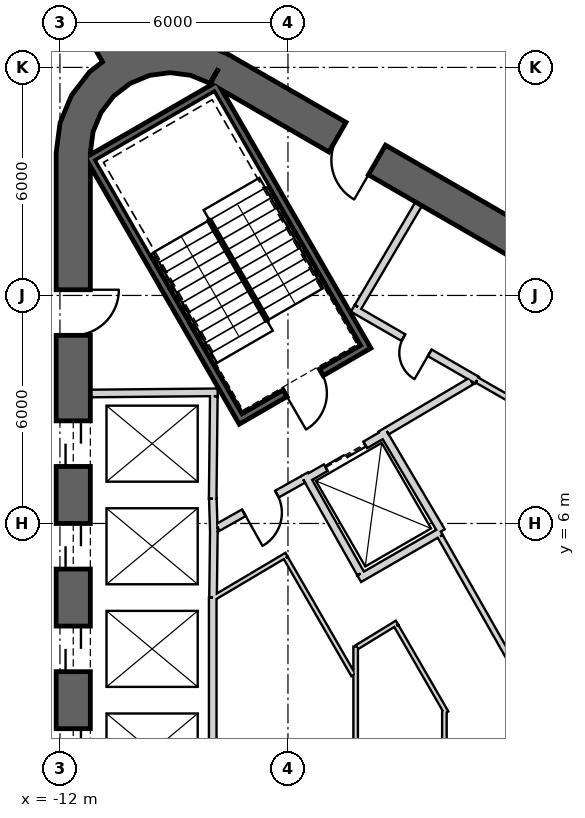
"""IFC4 building model, lengths in metres.
Left out: names, types, materials, properties, quantities, classifications, styles, units other than length and angle.
Written with IfcOpenShell. Run it as: python <this file> out.ifc"""

import sys

from ifc_helpers import new_model, si_unit, direction, frame, frame_2d, origin, place, context, subcontext, project, spatial, polyline, rectangle, outline, extrude, element, fill, save


model = new_model("IFC4")
c1 = context("Model", 3, precision=1e-05, world=origin(), true_north=direction((0.0, 1.0)))
c2 = subcontext(c1, "Body", "Model", "MODEL_VIEW")
j1 = project(units=[si_unit("LENGTHUNIT", "METRE"), si_unit("PLANEANGLEUNIT", "RADIAN")], contexts=[c1])
p1 = place(None, origin())
s1 = spatial("IfcSite", under=j1, at=p1, CompositionType="ELEMENT")
p2 = place(p1, origin())
s2 = spatial("IfcBuilding", under=s1, at=p2, CompositionType="ELEMENT")
p3 = place(p2, frame((0.0, 0.0, 265.2)))
s3 = spatial("IfcBuildingStorey", under=s2, at=p3, CompositionType="ELEMENT", Elevation=265.2)
p4 = place(p3, frame((19.475, 2.208, 0.0), z_axis=(0.0, 0.0, 1.0), x_axis=(-0.866028369851, 0.499994862586, 0.0)))
e1 = element("IfcWall", 1, at=p4, inside=s3, PredefinedType="SHEAR", context=c2, shape_type="SweptSolid", body=[
    extrude(rectangle(XDim=31.523, YDim=0.9, at=frame_2d((15.762, 0.0))), origin(), (0.0, 0.0, 1.0), 4.0),
])
p5 = place(p4, frame((7.062, 0.0, 0.0)))
e2 = element("IfcOpeningElement", 2, at=p5, cuts=e1, PredefinedType="OPENING", context=c2, shape_type="SweptSolid", body=[
    extrude(rectangle(XDim=1.2, YDim=2.4, at=frame_2d((0.6, 1.2))), frame((0.0, 0.46, 0.0), z_axis=(0.0, -1.0, 0.0), x_axis=(1.0, 0.0, 0.0)), (0.0, 0.0, 1.0), 0.92),
])
p6 = place(p4, frame((3.612, 0.0, 0.0)))
e3 = element("IfcOpeningElement", 3, at=p6, cuts=e1, PredefinedType="OPENING", context=c2, shape_type="SweptSolid", body=[
    extrude(rectangle(XDim=1.2, YDim=2.4, at=frame_2d((0.6, 1.2))), frame((0.0, 0.46, 0.0), z_axis=(0.0, -1.0, 0.0), x_axis=(1.0, 0.0, 0.0)), (0.0, 0.0, 1.0), 0.92),
])
p7 = place(p4, frame((26.712, 0.0, 0.0)))
e4 = element("IfcOpeningElement", 4, at=p7, cuts=e1, PredefinedType="OPENING", context=c2, shape_type="SweptSolid", body=[
    extrude(rectangle(XDim=1.2, YDim=2.4, at=frame_2d((0.6, 1.2))), frame((0.0, 0.46, 0.0), z_axis=(0.0, -1.0, 0.0), x_axis=(1.0, 0.0, 0.0)), (0.0, 0.0, 1.0), 0.92),
])
p8 = place(p3, frame((-11.65, 15.762, 0.0), z_axis=(0.0, 0.0, 1.0), x_axis=(0.0, -1.0, 0.0)))
e5 = element("IfcWall", 5, at=p8, inside=s3, PredefinedType="SHEAR", context=c2, shape_type="SweptSolid", body=[
    extrude(rectangle(XDim=31.523, YDim=0.9, at=frame_2d((15.762, 0.0))), origin(), (0.0, 0.0, 1.0), 4.0),
])
p9 = place(p8, frame((7.062, 0.0, 0.0)))
e6 = element("IfcOpeningElement", 6, at=p9, cuts=e5, PredefinedType="OPENING", context=c2, shape_type="SweptSolid", body=[
    extrude(rectangle(XDim=1.2, YDim=2.4, at=frame_2d((0.6, 1.2))), frame((0.0, 0.46, 0.0), z_axis=(0.0, -1.0, 0.0), x_axis=(1.0, 0.0, 0.0)), (0.0, 0.0, 1.0), 0.92),
])
p10 = place(p8, frame((9.762, 0.0, 0.0)))
e7 = element("IfcOpeningElement", 7, at=p10, cuts=e5, PredefinedType="OPENING", context=c2, shape_type="SweptSolid", body=[
    extrude(rectangle(XDim=1.2, YDim=2.4, at=frame_2d((0.6, 1.2))), frame((0.0, 0.46, 0.0), z_axis=(0.0, -1.0, 0.0), x_axis=(1.0, 0.0, 0.0)), (0.0, 0.0, 1.0), 0.92),
])
p11 = place(p8, frame((12.462, 0.0, 0.0)))
e8 = element("IfcOpeningElement", 8, at=p11, cuts=e5, PredefinedType="OPENING", context=c2, shape_type="SweptSolid", body=[
    extrude(rectangle(XDim=1.2, YDim=2.4, at=frame_2d((0.6, 1.2))), frame((0.0, 0.46, 0.0), z_axis=(0.0, -1.0, 0.0), x_axis=(1.0, 0.0, 0.0)), (0.0, 0.0, 1.0), 0.92),
])
p12 = place(p8, frame((15.162, 0.0, 0.0)))
e9 = element("IfcOpeningElement", 9, at=p12, cuts=e5, PredefinedType="OPENING", context=c2, shape_type="SweptSolid", body=[
    extrude(rectangle(XDim=1.2, YDim=2.4, at=frame_2d((0.6, 1.2))), frame((0.0, 0.46, 0.0), z_axis=(0.0, -1.0, 0.0), x_axis=(1.0, 0.0, 0.0)), (0.0, 0.0, 1.0), 0.92),
])
p13 = place(p8, frame((17.862, 0.0, 0.0)))
e10 = element("IfcOpeningElement", 10, at=p13, cuts=e5, PredefinedType="OPENING", context=c2, shape_type="SweptSolid", body=[
    extrude(rectangle(XDim=1.2, YDim=2.4, at=frame_2d((0.6, 1.2))), frame((0.0, 0.46, 0.0), z_axis=(0.0, -1.0, 0.0), x_axis=(1.0, 0.0, 0.0)), (0.0, 0.0, 1.0), 0.92),
])
p14 = place(p8, frame((20.562, 0.0, 0.0)))
e11 = element("IfcOpeningElement", 11, at=p14, cuts=e5, PredefinedType="OPENING", context=c2, shape_type="SweptSolid", body=[
    extrude(rectangle(XDim=1.2, YDim=2.4, at=frame_2d((0.6, 1.2))), frame((0.0, 0.46, 0.0), z_axis=(0.0, -1.0, 0.0), x_axis=(1.0, 0.0, 0.0)), (0.0, 0.0, 1.0), 0.92),
])
p15 = place(p8, frame((23.262, 0.0, 0.0)))
e12 = element("IfcOpeningElement", 12, at=p15, cuts=e5, PredefinedType="OPENING", context=c2, shape_type="SweptSolid", body=[
    extrude(rectangle(XDim=1.2, YDim=2.4, at=frame_2d((0.6, 1.2))), frame((0.0, 0.46, 0.0), z_axis=(0.0, -1.0, 0.0), x_axis=(1.0, 0.0, 0.0)), (0.0, 0.0, 1.0), 0.92),
])
p16 = place(p8, frame((3.612, 0.0, 0.0)))
e13 = element("IfcOpeningElement", 13, at=p16, cuts=e5, PredefinedType="OPENING", context=c2, shape_type="SweptSolid", body=[
    extrude(rectangle(XDim=1.2, YDim=2.4, at=frame_2d((0.6, 1.2))), frame((0.0, 0.46, 0.0), z_axis=(0.0, -1.0, 0.0), x_axis=(1.0, 0.0, 0.0)), (0.0, 0.0, 1.0), 0.92),
])
p17 = place(p8, frame((26.712, 0.0, 0.0)))
e14 = element("IfcOpeningElement", 14, at=p17, cuts=e5, PredefinedType="OPENING", context=c2, shape_type="SweptSolid", body=[
    extrude(rectangle(XDim=1.2, YDim=2.4, at=frame_2d((0.6, 1.2))), frame((0.0, 0.46, 0.0), z_axis=(0.0, -1.0, 0.0), x_axis=(1.0, 0.0, 0.0)), (0.0, 0.0, 1.0), 0.92),
])
p18 = place(p3, origin())
e15 = element("IfcWall", 15, at=p18, inside=s3, PredefinedType="SHEAR", context=c2, shape_type="SweptSolid", body=[
    extrude(outline(polyline([(-7.6, 18.36), (-8.323, 18.659), (-9.1, 18.762), (-9.876, 18.659), (-10.6, 18.36), (-11.221, 17.883), (-11.698, 17.262), (-11.998, 16.538), (-12.1, 15.762), (-11.2, 15.762), (-11.128, 16.305), (-10.919, 16.812), (-10.585, 17.247), (-10.15, 17.58), (-9.644, 17.79), (-9.1, 17.862), (-8.556, 17.79), (-8.05, 17.58), (-7.6, 18.36)])), origin(), (0.0, 0.0, 1.0), 4.0),
])
p19 = place(p3, frame((-10.575, 18.316, 0.0), z_axis=(0.0, 0.0, 1.0), x_axis=(-0.500007350791, 0.866021159762, 0.0)))
e16 = element("IfcWall", 16, at=p19, inside=s3, PredefinedType="SHEAR", context=c2, shape_type="SweptSolid", body=[
    extrude(rectangle(XDim=9.965, YDim=0.7, at=frame_2d((4.982, 0.0))), origin(), (0.0, 0.0, 1.0), 4.0),
])
p20 = place(p3, frame((-11.2, 9.42, 0.0), z_axis=(0.0, 0.0, 1.0), x_axis=(0.999957167047, 0.009255488683, 0.0)))
e17 = element("IfcWall", 17, at=p20, inside=s3, PredefinedType="PLUMBINGWALL", context=c2, shape_type="SweptSolid", body=[
    extrude(rectangle(XDim=3.35, YDim=0.2, at=frame_2d((1.675, 0.0))), origin(), (0.0, 0.0, 1.0), 3.7),
])
p21 = place(p3, frame((-7.951, 9.35, 0.0), z_axis=(0.0, 0.0, 1.0), x_axis=(-0.011120469654, -0.999938165666, 0.0)))
e18 = element("IfcWall", 18, at=p21, inside=s3, PredefinedType="PLUMBINGWALL", context=c2, shape_type="SweptSolid", body=[
    extrude(rectangle(XDim=2.7, YDim=0.2, at=frame_2d((1.35, 0.0))), origin(), (0.0, 0.0, 1.0), 3.7),
])
p22 = place(p3, frame((-7.977, 6.65, 0.0), z_axis=(0.0, 0.0, 1.0), x_axis=(0.030861509705, -0.999523670164, 0.0)))
e19 = element("IfcWall", 19, at=p22, inside=s3, PredefinedType="PLUMBINGWALL", context=c2, shape_type="SweptSolid", body=[
    extrude(rectangle(XDim=0.878, YDim=0.2, at=frame_2d((0.439, 0.0))), origin(), (0.0, 0.0, 1.0), 3.7),
])
p23 = place(p3, frame((-7.949, 5.895, 0.0), z_axis=(0.0, 0.0, 1.0), x_axis=(-0.012042535896, -0.999927486035, 0.0)))
e20 = element("IfcWall", 20, at=p23, inside=s3, PredefinedType="PLUMBINGWALL", context=c2, shape_type="SweptSolid", body=[
    extrude(rectangle(XDim=1.845, YDim=0.2, at=frame_2d((0.922, 0.0))), origin(), (0.0, 0.0, 1.0), 3.7),
])
p24 = place(p3, frame((-7.98, 4.05, 0.0), z_axis=(0.0, 0.0, 1.0), x_axis=(0.0, -1.0, 0.0)))
e21 = element("IfcWall", 21, at=p24, inside=s3, PredefinedType="PLUMBINGWALL", context=c2, shape_type="SweptSolid", body=[
    extrude(rectangle(XDim=8.1, YDim=0.2, at=frame_2d((4.05, 0.0))), origin(), (0.0, 0.0, 1.0), 3.7),
])
p25 = place(p3, frame((-11.245, 15.678, -0.3), z_axis=(0.0, 0.0, 1.0), x_axis=(0.499977274689, -0.866038523851, 0.0)))
e22 = element("IfcWall", 22, at=p25, inside=s3, PredefinedType="SHEAR", context=c2, shape_type="SweptSolid", body=[
    extrude(rectangle(XDim=8.1, YDim=0.2, at=frame_2d((4.05, 0.0))), origin(), (0.0, 0.0, 1.0), 4.0),
])
p26 = place(p3, frame((-7.818, 17.541, -0.3), z_axis=(0.0, 0.0, 1.0), x_axis=(-0.866044365799, -0.499967155389, 0.0)))
e23 = element("IfcWall", 23, at=p26, inside=s3, PredefinedType="SHEAR", context=c2, shape_type="SweptSolid", body=[
    extrude(rectangle(XDim=3.8, YDim=0.2, at=frame_2d((1.9, 0.0))), origin(), (0.0, 0.0, 1.0), 4.0),
])
p27 = place(p3, frame((-7.854, 17.405, -0.3), z_axis=(0.0, 0.0, 1.0), x_axis=(0.499997992926, -0.866026562566, 0.0)))
e24 = element("IfcWall", 24, at=p27, inside=s3, PredefinedType="SHEAR", context=c2, shape_type="SweptSolid", body=[
    extrude(rectangle(XDim=7.9, YDim=0.2, at=frame_2d((3.95, 0.0))), origin(), (0.0, 0.0, 1.0), 4.0),
])
p28 = place(p3, frame((-7.159, 8.8, -0.3), z_axis=(0.0, 0.0, 1.0), x_axis=(0.866047807691, 0.499961193289, 0.0)))
e25 = element("IfcWall", 25, at=p28, inside=s3, PredefinedType="SHEAR", context=c2, shape_type="SweptSolid", body=[
    extrude(rectangle(XDim=3.6, YDim=0.2, at=frame_2d((1.8, 0.0))), origin(), (0.0, 0.0, 1.0), 4.0),
])
p29 = place(p28, frame((1.25, 0.0, 0.3)))
e26 = element("IfcOpeningElement", 26, at=p29, cuts=e25, PredefinedType="OPENING", context=c2, shape_type="SweptSolid", body=[
    extrude(rectangle(XDim=1.1, YDim=2.1, at=frame_2d((0.55, 1.05))), frame((0.0, 0.11, 0.0), z_axis=(0.0, -1.0, 0.0), x_axis=(1.0, 0.0, 0.0)), (0.0, 0.0, 1.0), 0.22),
])
p30 = place(p3, frame((-5.524, 7.168, 0.0), z_axis=(0.0, 0.0, 1.0), x_axis=(0.866024647952, 0.500001309137, 0.0)))
e27 = element("IfcWall", 27, at=p30, inside=s3, PredefinedType="PLUMBINGWALL", context=c2, shape_type="SweptSolid", body=[
    extrude(rectangle(XDim=2.4, YDim=0.2, at=frame_2d((1.2, 0.0))), origin(), (0.0, 0.0, 1.0), 3.7),
])
p31 = place(p30, frame((0.6, 0.0, 0.0)))
e28 = element("IfcOpeningElement", 28, at=p31, cuts=e27, PredefinedType="OPENING", context=c2, shape_type="SweptSolid", body=[
    extrude(rectangle(XDim=1.2, YDim=2.4, at=frame_2d((0.6, 1.2))), frame((0.0, 0.11, 0.0), z_axis=(0.0, -1.0, 0.0), x_axis=(1.0, 0.0, 0.0)), (0.0, 0.0, 1.0), 0.22),
])
p32 = place(p3, frame((-3.538, 8.465, 0.0), z_axis=(0.0, 0.0, 1.0), x_axis=(0.508647062354, -0.860975125052, 0.0)))
e29 = element("IfcWall", 29, at=p32, inside=s3, PredefinedType="PLUMBINGWALL", context=c2, shape_type="SweptSolid", body=[
    extrude(rectangle(XDim=3.1, YDim=0.2, at=frame_2d((1.55, 0.0))), origin(), (0.0, 0.0, 1.0), 3.7),
])
p33 = place(p3, frame((-1.979, 5.786, 0.0), z_axis=(0.0, 0.0, 1.0), x_axis=(-0.866016689309, -0.500015093611, 0.0)))
e30 = element("IfcWall", 30, at=p33, inside=s3, PredefinedType="PLUMBINGWALL", context=c2, shape_type="SweptSolid", body=[
    extrude(rectangle(XDim=2.479, YDim=0.2, at=frame_2d((1.24, 0.0))), origin(), (0.0, 0.0, 1.0), 3.7),
])
p34 = place(p3, frame((-5.562, 7.296, 0.0), z_axis=(0.0, 0.0, 1.0), x_axis=(0.49134651263, -0.870964180966, 0.0)))
e31 = element("IfcWall", 31, at=p34, inside=s3, PredefinedType="PLUMBINGWALL", context=c2, shape_type="SweptSolid", body=[
    extrude(rectangle(XDim=3.0, YDim=0.2, at=frame_2d((1.5, 0.0))), origin(), (0.0, 0.0, 1.0), 3.7),
])
p35 = place(p3, frame((7.497, 4.886, 0.0), z_axis=(0.0, 0.0, 1.0), x_axis=(-0.867541725638, 0.497364407931, 0.0)))
e32 = element("IfcWall", 32, at=p35, inside=s3, PredefinedType="PLUMBINGWALL", context=c2, shape_type="SweptSolid", body=[
    extrude(rectangle(XDim=9.822, YDim=0.15, at=frame_2d((4.911, 0.0))), origin(), (0.0, 0.0, 1.0), 3.7),
])
p36 = place(p35, frame((2.3, 0.0, 0.0)))
e33 = element("IfcOpeningElement", 33, at=p36, cuts=e32, PredefinedType="OPENING", context=c2, shape_type="SweptSolid", body=[
    extrude(rectangle(XDim=0.8, YDim=2.1, at=frame_2d((0.4, 1.05))), frame((0.0, 0.085, 0.0), z_axis=(0.0, -1.0, 0.0), x_axis=(1.0, 0.0, 0.0)), (0.0, 0.0, 1.0), 0.17),
])
p37 = place(p3, frame((-4.296, 11.66, 0.0), z_axis=(0.0, 0.0, 1.0), x_axis=(0.866027389382, -0.499996560828, 0.0)))
e34 = element("IfcWall", 34, at=p37, inside=s3, PredefinedType="PARTITIONING", context=c2, shape_type="SweptSolid", body=[
    extrude(rectangle(XDim=3.778, YDim=0.2, at=frame_2d((1.889, 0.0))), origin(), (0.0, 0.0, 1.0), 3.7),
])
p38 = place(p37, frame((1.539, 0.0, 0.0)))
e35 = element("IfcOpeningElement", 35, at=p38, cuts=e34, PredefinedType="OPENING", context=c2, shape_type="SweptSolid", body=[
    extrude(rectangle(XDim=0.8, YDim=2.1, at=frame_2d((0.4, 1.05))), frame((0.0, 0.11, 0.0), z_axis=(0.0, -1.0, 0.0), x_axis=(1.0, 0.0, 0.0)), (0.0, 0.0, 1.0), 0.22),
])
p39 = place(p3, frame((-2.558, 14.409, 0.0), z_axis=(0.0, 0.0, 1.0), x_axis=(-0.508018930956, -0.861345903683, 0.0)))
e36 = element("IfcWall", 36, at=p39, inside=s3, PredefinedType="PARTITIONING", context=c2, shape_type="SweptSolid", body=[
    extrude(rectangle(XDim=3.15, YDim=0.2, at=frame_2d((1.575, 0.0))), origin(), (0.0, 0.0, 1.0), 3.7),
])
p40 = place(p3, frame((-1.179, 9.745, 0.0), z_axis=(0.0, 0.0, 1.0), x_axis=(-0.860630814782, -0.509229418482, 0.0)))
e37 = element("IfcWall", 37, at=p40, inside=s3, PredefinedType="PARTITIONING", context=c2, shape_type="SweptSolid", body=[
    extrude(rectangle(XDim=2.582, YDim=0.2, at=frame_2d((1.291, 0.0))), origin(), (0.0, 0.0, 1.0), 3.7),
])
p41 = place(p3, frame((-5.6, 7.16, 0.0), z_axis=(0.0, 0.0, 1.0), x_axis=(-0.871363259478, -0.490638431059, 0.0)))
e38 = element("IfcWall", 38, at=p41, inside=s3, PredefinedType="PARTITIONING", context=c2, shape_type="SweptSolid", body=[
    extrude(rectangle(XDim=2.581, YDim=0.2, at=frame_2d((1.291, 0.0))), origin(), (0.0, 0.0, 1.0), 3.7),
])
p42 = place(p41, frame((0.791, 0.0, 0.0)))
e39 = element("IfcOpeningElement", 39, at=p42, cuts=e38, PredefinedType="OPENING", context=c2, shape_type="SweptSolid", body=[
    extrude(rectangle(XDim=1.0, YDim=2.1, at=frame_2d((0.5, 1.05))), frame((0.0, 0.11, 0.0), z_axis=(0.0, -1.0, 0.0), x_axis=(1.0, 0.0, 0.0)), (0.0, 0.0, 1.0), 0.22),
])
p43 = place(p3, frame((-1.994, 5.661, 0.0), z_axis=(0.0, 0.0, 1.0), x_axis=(0.493780191404, -0.869586753911, 0.0)))
e40 = element("IfcWall", 40, at=p43, inside=s3, PredefinedType="PLUMBINGWALL", context=c2, shape_type="SweptSolid", body=[
    extrude(rectangle(XDim=3.971, YDim=0.15, at=frame_2d((1.986, 0.0))), origin(), (0.0, 0.0, 1.0), 3.7),
])
p44 = place(p3, frame((-4.219, -2.76, 0.0), z_axis=(0.0, 0.0, 1.0), x_axis=(0.0, 1.0, 0.0)))
e41 = element("IfcWall", 41, at=p44, inside=s3, PredefinedType="PARTITIONING", context=c2, shape_type="SweptSolid", body=[
    extrude(rectangle(XDim=5.521, YDim=0.12, at=frame_2d((2.76, 0.0))), origin(), (0.0, 0.0, 1.0), 3.7),
])
p45 = place(p3, frame((-6.037, 5.176, 0.0), z_axis=(0.0, 0.0, 1.0), x_axis=(-0.860106072674, -0.510115225953, 0.0)))
e42 = element("IfcWall", 42, at=p45, inside=s3, PredefinedType="PARTITIONING", context=c2, shape_type="SweptSolid", body=[
    extrude(rectangle(XDim=2.225, YDim=0.12, at=frame_2d((1.112, 0.0))), origin(), (0.0, 0.0, 1.0), 3.7),
])
p46 = place(p3, frame((-4.279, 2.011, 0.0), z_axis=(0.0, 0.0, 1.0), x_axis=(-0.500027278734, 0.866009653827, 0.0)))
e43 = element("IfcWall", 43, at=p46, inside=s3, PredefinedType="PARTITIONING", context=c2, shape_type="SweptSolid", body=[
    extrude(rectangle(XDim=3.559, YDim=0.12, at=frame_2d((1.779, 0.0))), origin(), (0.0, 0.0, 1.0), 3.7),
])
p47 = place(p3, frame((-3.13, 3.391, 0.0), z_axis=(0.0, 0.0, 1.0), x_axis=(-0.853228335638, -0.521537541567, 0.0)))
e44 = element("IfcWall", 44, at=p47, inside=s3, PredefinedType="PARTITIONING", context=c2, shape_type="SweptSolid", body=[
    extrude(rectangle(XDim=1.241, YDim=0.12, at=frame_2d((0.621, 0.0))), origin(), (0.0, 0.0, 1.0), 3.7),
])
p48 = place(p3, frame((-1.832, 1.022, 0.0), z_axis=(0.0, 0.0, 1.0), x_axis=(-0.500000102728, 0.866025344474, 0.0)))
e45 = element("IfcWall", 45, at=p48, inside=s3, PredefinedType="PARTITIONING", context=c2, shape_type="SweptSolid", body=[
    extrude(rectangle(XDim=2.639, YDim=0.12, at=frame_2d((1.319, 0.0))), origin(), (0.0, 0.0, 1.0), 3.7),
])
p49 = place(p3, frame((-1.884, -1.216, 0.0), z_axis=(0.0, 0.0, 1.0), x_axis=(0.0, 1.0, 0.0)))
e46 = element("IfcWall", 46, at=p49, inside=s3, PredefinedType="PARTITIONING", context=c2, shape_type="SweptSolid", body=[
    extrude(rectangle(XDim=2.31, YDim=0.12, at=frame_2d((1.155, 0.0))), origin(), (0.0, 0.0, 1.0), 3.7),
])
p50 = place(p3, frame((9.825, 12.918, 0.0), z_axis=(0.0, 0.0, 1.0), x_axis=(-0.866022708987, 0.500004667497, 0.0)))
e47 = element("IfcWall", 47, at=p50, inside=s3, PredefinedType="PARTITIONING", context=c2, shape_type="SweptSolid", body=[
    extrude(rectangle(XDim=18.496, YDim=0.2, at=frame_2d((9.248, 0.0))), origin(), (0.0, 0.0, 1.0), 2.98),
])
p51 = place(p29, origin())
e48 = element("IfcDoor", 48, at=p51, inside=s3, OperationType="SINGLE_SWING_RIGHT", PredefinedType="USERDEFINED", context=c2, shape_type="SweptSolid", body=[
    extrude(rectangle(XDim=1.1, YDim=2.1, at=frame_2d((0.55, 1.05))), frame((0.0, 0.025, 0.0), z_axis=(0.0, -1.0, 0.0), x_axis=(1.0, 0.0, 0.0)), (0.0, 0.0, 1.0), 0.05),
])
fill(e26, e48)
p52 = place(p42, origin())
e49 = element("IfcDoor", 49, at=p52, inside=s3, OperationType="SINGLE_SWING_LEFT", PredefinedType="USERDEFINED", context=c2, shape_type="SweptSolid", body=[
    extrude(rectangle(XDim=1.0, YDim=2.1, at=frame_2d((0.5, 1.05))), frame((0.0, 0.025, 0.0), z_axis=(0.0, -1.0, 0.0), x_axis=(1.0, 0.0, 0.0)), (0.0, 0.0, 1.0), 0.05),
])
fill(e39, e49)
p53 = place(p31, origin())
e50 = element("IfcDoor", 50, at=p53, inside=s3, OperationType="SLIDING_TO_LEFT", PredefinedType="USERDEFINED", context=c2, shape_type="SweptSolid", body=[
    extrude(rectangle(XDim=1.2, YDim=2.4, at=frame_2d((0.6, 1.2))), frame((0.0, 0.025, 0.0), z_axis=(0.0, -1.0, 0.0), x_axis=(1.0, 0.0, 0.0)), (0.0, 0.0, 1.0), 0.05),
])
fill(e28, e50)
p54 = place(p38, origin())
e51 = element("IfcDoor", 51, at=p54, inside=s3, OperationType="SINGLE_SWING_LEFT", PredefinedType="USERDEFINED", context=c2, shape_type="SweptSolid", body=[
    extrude(rectangle(XDim=0.8, YDim=2.1, at=frame_2d((0.4, 1.05))), frame((0.0, 0.025, 0.0), z_axis=(0.0, -1.0, 0.0), x_axis=(1.0, 0.0, 0.0)), (0.0, 0.0, 1.0), 0.05),
])
fill(e35, e51)
p55 = place(p9, origin())
e52 = element("IfcDoor", 52, at=p55, inside=s3, OperationType="SLIDING_TO_LEFT", PredefinedType="USERDEFINED", context=c2, shape_type="SweptSolid", body=[
    extrude(rectangle(XDim=1.2, YDim=2.4, at=frame_2d((0.6, 1.2))), frame((0.0, 0.025, 0.0), z_axis=(0.0, -1.0, 0.0), x_axis=(1.0, 0.0, 0.0)), (0.0, 0.0, 1.0), 0.05),
])
fill(e6, e52)
p56 = place(p10, origin())
e53 = element("IfcDoor", 53, at=p56, inside=s3, OperationType="SLIDING_TO_LEFT", PredefinedType="USERDEFINED", context=c2, shape_type="SweptSolid", body=[
    extrude(rectangle(XDim=1.2, YDim=2.4, at=frame_2d((0.6, 1.2))), frame((0.0, 0.025, 0.0), z_axis=(0.0, -1.0, 0.0), x_axis=(1.0, 0.0, 0.0)), (0.0, 0.0, 1.0), 0.05),
])
fill(e7, e53)
p57 = place(p11, origin())
e54 = element("IfcDoor", 54, at=p57, inside=s3, OperationType="SLIDING_TO_LEFT", PredefinedType="USERDEFINED", context=c2, shape_type="SweptSolid", body=[
    extrude(rectangle(XDim=1.2, YDim=2.4, at=frame_2d((0.6, 1.2))), frame((0.0, 0.025, 0.0), z_axis=(0.0, -1.0, 0.0), x_axis=(1.0, 0.0, 0.0)), (0.0, 0.0, 1.0), 0.05),
])
fill(e8, e54)
p58 = place(p12, origin())
e55 = element("IfcDoor", 55, at=p58, inside=s3, OperationType="SLIDING_TO_LEFT", PredefinedType="USERDEFINED", context=c2, shape_type="SweptSolid", body=[
    extrude(rectangle(XDim=1.2, YDim=2.4, at=frame_2d((0.6, 1.2))), frame((0.0, 0.025, 0.0), z_axis=(0.0, -1.0, 0.0), x_axis=(1.0, 0.0, 0.0)), (0.0, 0.0, 1.0), 0.05),
])
fill(e9, e55)
p59 = place(p7, origin())
e56 = element("IfcDoor", 56, at=p59, inside=s3, OperationType="SINGLE_SWING_RIGHT", PredefinedType="USERDEFINED", context=c2, shape_type="SweptSolid", body=[
    extrude(rectangle(XDim=1.2, YDim=2.4, at=frame_2d((0.6, 1.2))), frame((0.0, 0.025, 0.0), z_axis=(0.0, -1.0, 0.0), x_axis=(1.0, 0.0, 0.0)), (0.0, 0.0, 1.0), 0.05),
])
fill(e4, e56)
p60 = place(p16, origin())
e57 = element("IfcDoor", 57, at=p60, inside=s3, OperationType="SINGLE_SWING_RIGHT", PredefinedType="USERDEFINED", context=c2, shape_type="SweptSolid", body=[
    extrude(rectangle(XDim=1.2, YDim=2.4, at=frame_2d((0.6, 1.2))), frame((0.0, 0.025, 0.0), z_axis=(0.0, -1.0, 0.0), x_axis=(1.0, 0.0, 0.0)), (0.0, 0.0, 1.0), 0.05),
])
fill(e13, e57)
save(model, sys.argv[1])
